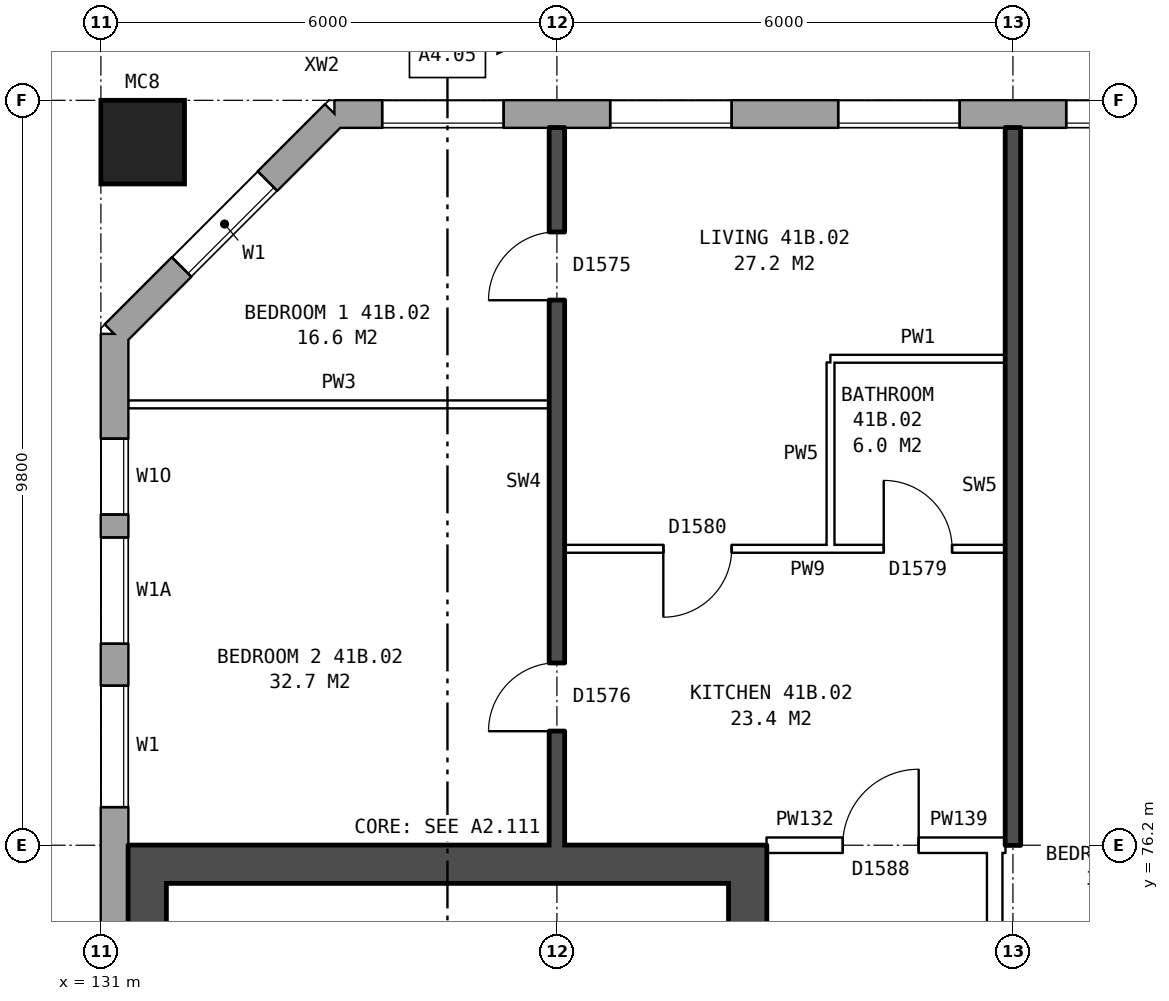
"""IFC4 building model, lengths in metres.
Left out: names, types, materials, properties, quantities, classifications, styles, units other than length and angle.
Written with IfcOpenShell. Run it as: python <this file> out.ifc"""

import sys

from ifc_helpers import new_model, si_unit, direction, frame, frame_2d, origin, origin_2d, place, context, subcontext, project, spatial, rectangle, hollow_rectangle, extrude, element, fill, save


model = new_model("IFC4")
c1 = context("Model", 3, precision=1e-05, world=origin(), true_north=direction((0.0, 1.0)))
c2 = subcontext(c1, "Body", "Model", "MODEL_VIEW")
j1 = project(units=[si_unit("LENGTHUNIT", "METRE"), si_unit("PLANEANGLEUNIT", "RADIAN")], contexts=[c1])
p1 = place(None, origin())
s1 = spatial("IfcSite", under=j1, at=p1, CompositionType="ELEMENT")
p2 = place(p1, origin())
s2 = spatial("IfcBuilding", under=s1, at=p2, CompositionType="ELEMENT")
p3 = place(p2, frame((0.0, 0.0, 148.5)))
s3 = spatial("IfcBuildingStorey", under=s2, at=p3, CompositionType="ELEMENT", Elevation=148.5)
p4 = place(p3, frame((131.55, 85.45, 0.0), z_axis=(0.0, 0.0, 1.0), x_axis=(1.0, 0.0, 0.0)))
e1 = element("IfcColumn", 1, at=p4, inside=s3, PredefinedType="COLUMN", context=c2, shape_type="SweptSolid", body=[
    extrude(hollow_rectangle(XDim=1.1, YDim=1.1, WallThickness=0.06, at=origin_2d()), origin(), (0.0, 0.0, 1.0), 3.1),
])
p5 = place(p3, frame((168.425, 85.82, 0.0), z_axis=(0.0, 0.0, 1.0), x_axis=(-1.0, 0.0, 0.0)))
e2 = element("IfcWall", 2, at=p5, inside=s3, PredefinedType="STANDARD", context=c2, shape_type="SweptSolid", body=[
    extrude(rectangle(XDim=34.351, YDim=0.36, at=frame_2d((17.175, 0.0))), origin(), (0.0, 0.0, 1.0), 2.85),
])
p6 = place(p5, frame((2.125, 0.0, 0.8)))
e3 = element("IfcOpeningElement", 3, at=p6, cuts=e2, PredefinedType="OPENING", context=c2, shape_type="SweptSolid", body=[
    extrude(rectangle(XDim=1.6, YDim=1.8, at=frame_2d((0.8, 0.9))), frame((0.0, 0.19, 0.0), z_axis=(0.0, -1.0, 0.0), x_axis=(1.0, 0.0, 0.0)), (0.0, 0.0, 1.0), 0.38),
])
p7 = place(p5, frame((5.125, 0.0, 0.8)))
e4 = element("IfcOpeningElement", 4, at=p7, cuts=e2, PredefinedType="OPENING", context=c2, shape_type="SweptSolid", body=[
    extrude(rectangle(XDim=1.6, YDim=1.8, at=frame_2d((0.8, 0.9))), frame((0.0, 0.19, 0.0), z_axis=(0.0, -1.0, 0.0), x_axis=(1.0, 0.0, 0.0)), (0.0, 0.0, 1.0), 0.38),
])
p8 = place(p5, frame((8.125, 0.0, 0.8)))
e5 = element("IfcOpeningElement", 5, at=p8, cuts=e2, PredefinedType="OPENING", context=c2, shape_type="SweptSolid", body=[
    extrude(rectangle(XDim=1.6, YDim=1.8, at=frame_2d((0.8, 0.9))), frame((0.0, 0.19, 0.0), z_axis=(0.0, -1.0, 0.0), x_axis=(1.0, 0.0, 0.0)), (0.0, 0.0, 1.0), 0.38),
])
p9 = place(p5, frame((11.125, 0.0, 0.8)))
e6 = element("IfcOpeningElement", 6, at=p9, cuts=e2, PredefinedType="OPENING", context=c2, shape_type="SweptSolid", body=[
    extrude(rectangle(XDim=1.6, YDim=1.8, at=frame_2d((0.8, 0.9))), frame((0.0, 0.19, 0.0), z_axis=(0.0, -1.0, 0.0), x_axis=(1.0, 0.0, 0.0)), (0.0, 0.0, 1.0), 0.38),
])
p10 = place(p5, frame((14.125, 0.0, 0.8)))
e7 = element("IfcOpeningElement", 7, at=p10, cuts=e2, PredefinedType="OPENING", context=c2, shape_type="SweptSolid", body=[
    extrude(rectangle(XDim=1.6, YDim=1.8, at=frame_2d((0.8, 0.9))), frame((0.0, 0.19, 0.0), z_axis=(0.0, -1.0, 0.0), x_axis=(1.0, 0.0, 0.0)), (0.0, 0.0, 1.0), 0.38),
])
p11 = place(p5, frame((17.125, 0.0, 0.8)))
e8 = element("IfcOpeningElement", 8, at=p11, cuts=e2, PredefinedType="OPENING", context=c2, shape_type="SweptSolid", body=[
    extrude(rectangle(XDim=1.6, YDim=1.8, at=frame_2d((0.8, 0.9))), frame((0.0, 0.19, 0.0), z_axis=(0.0, -1.0, 0.0), x_axis=(1.0, 0.0, 0.0)), (0.0, 0.0, 1.0), 0.38),
])
p12 = place(p5, frame((20.125, 0.0, 0.8)))
e9 = element("IfcOpeningElement", 9, at=p12, cuts=e2, PredefinedType="OPENING", context=c2, shape_type="SweptSolid", body=[
    extrude(rectangle(XDim=1.6, YDim=1.8, at=frame_2d((0.8, 0.9))), frame((0.0, 0.19, 0.0), z_axis=(0.0, -1.0, 0.0), x_axis=(1.0, 0.0, 0.0)), (0.0, 0.0, 1.0), 0.38),
])
p13 = place(p5, frame((23.125, 0.0, 0.8)))
e10 = element("IfcOpeningElement", 10, at=p13, cuts=e2, PredefinedType="OPENING", context=c2, shape_type="SweptSolid", body=[
    extrude(rectangle(XDim=1.6, YDim=1.8, at=frame_2d((0.8, 0.9))), frame((0.0, 0.19, 0.0), z_axis=(0.0, -1.0, 0.0), x_axis=(1.0, 0.0, 0.0)), (0.0, 0.0, 1.0), 0.38),
])
p14 = place(p5, frame((26.125, 0.0, 0.8)))
e11 = element("IfcOpeningElement", 11, at=p14, cuts=e2, PredefinedType="OPENING", context=c2, shape_type="SweptSolid", body=[
    extrude(rectangle(XDim=1.6, YDim=1.8, at=frame_2d((0.8, 0.9))), frame((0.0, 0.19, 0.0), z_axis=(0.0, -1.0, 0.0), x_axis=(1.0, 0.0, 0.0)), (0.0, 0.0, 1.0), 0.38),
])
p15 = place(p5, frame((29.125, 0.0, 0.8)))
e12 = element("IfcOpeningElement", 12, at=p15, cuts=e2, PredefinedType="OPENING", context=c2, shape_type="SweptSolid", body=[
    extrude(rectangle(XDim=1.6, YDim=1.8, at=frame_2d((0.8, 0.9))), frame((0.0, 0.19, 0.0), z_axis=(0.0, -1.0, 0.0), x_axis=(1.0, 0.0, 0.0)), (0.0, 0.0, 1.0), 0.38),
])
p16 = place(p5, frame((32.125, 0.0, 0.8)))
e13 = element("IfcOpeningElement", 13, at=p16, cuts=e2, PredefinedType="OPENING", context=c2, shape_type="SweptSolid", body=[
    extrude(rectangle(XDim=1.6, YDim=1.8, at=frame_2d((0.8, 0.9))), frame((0.0, 0.19, 0.0), z_axis=(0.0, -1.0, 0.0), x_axis=(1.0, 0.0, 0.0)), (0.0, 0.0, 1.0), 0.38),
])
p17 = place(p3, frame((134.075, 85.82, 0.0), z_axis=(0.0, 0.0, 1.0), x_axis=(-0.707106781187, -0.707106781187, 0.0)))
e14 = element("IfcWall", 14, at=p17, inside=s3, PredefinedType="STANDARD", context=c2, shape_type="SweptSolid", body=[
    extrude(rectangle(XDim=4.094, YDim=0.36, at=frame_2d((2.047, 0.0))), origin(), (0.0, 0.0, 1.0), 2.85),
])
p18 = place(p17, frame((1.247, 0.0, 0.8)))
e15 = element("IfcOpeningElement", 15, at=p18, cuts=e14, PredefinedType="OPENING", context=c2, shape_type="SweptSolid", body=[
    extrude(rectangle(XDim=1.6, YDim=1.8, at=frame_2d((0.8, 0.9))), frame((0.0, 0.19, 0.0), z_axis=(0.0, -1.0, 0.0), x_axis=(1.0, 0.0, 0.0)), (0.0, 0.0, 1.0), 0.38),
])
p19 = place(p3, frame((131.18, 82.925, 0.0), z_axis=(0.0, 0.0, 1.0), x_axis=(0.0, -1.0, 0.0)))
e16 = element("IfcWall", 16, at=p19, inside=s3, PredefinedType="STANDARD", context=c2, shape_type="SweptSolid", body=[
    extrude(rectangle(XDim=25.851, YDim=0.36, at=frame_2d((12.925, 0.0))), origin(), (0.0, 0.0, 1.0), 2.85),
])
p20 = place(p19, frame((1.375, 0.0, 0.8)))
e17 = element("IfcOpeningElement", 17, at=p20, cuts=e16, PredefinedType="OPENING", context=c2, shape_type="SweptSolid", body=[
    extrude(rectangle(XDim=1.0, YDim=1.2, at=frame_2d((0.5, 0.6))), frame((0.0, 0.19, 0.0), z_axis=(0.0, -1.0, 0.0), x_axis=(1.0, 0.0, 0.0)), (0.0, 0.0, 1.0), 0.38),
])
p21 = place(p19, frame((4.625, 0.0, 0.8)))
e18 = element("IfcOpeningElement", 18, at=p21, cuts=e16, PredefinedType="OPENING", context=c2, shape_type="SweptSolid", body=[
    extrude(rectangle(XDim=1.6, YDim=1.8, at=frame_2d((0.8, 0.9))), frame((0.0, 0.19, 0.0), z_axis=(0.0, -1.0, 0.0), x_axis=(1.0, 0.0, 0.0)), (0.0, 0.0, 1.0), 0.38),
])
p22 = place(p19, frame((19.625, 0.0, 0.8)))
e19 = element("IfcOpeningElement", 19, at=p22, cuts=e16, PredefinedType="OPENING", context=c2, shape_type="SweptSolid", body=[
    extrude(rectangle(XDim=1.6, YDim=1.8, at=frame_2d((0.8, 0.9))), frame((0.0, 0.19, 0.0), z_axis=(0.0, -1.0, 0.0), x_axis=(1.0, 0.0, 0.0)), (0.0, 0.0, 1.0), 0.38),
])
p23 = place(p19, frame((21.525, 0.0, 0.8)))
e20 = element("IfcOpeningElement", 20, at=p23, cuts=e16, PredefinedType="OPENING", context=c2, shape_type="SweptSolid", body=[
    extrude(rectangle(XDim=1.4, YDim=1.8, at=frame_2d((0.7, 0.9))), frame((0.0, 0.19, 0.0), z_axis=(0.0, -1.0, 0.0), x_axis=(1.0, 0.0, 0.0)), (0.0, 0.0, 1.0), 0.38),
])
p24 = place(p19, frame((2.675, 0.0, 0.8)))
e21 = element("IfcOpeningElement", 21, at=p24, cuts=e16, PredefinedType="OPENING", context=c2, shape_type="SweptSolid", body=[
    extrude(rectangle(XDim=1.4, YDim=1.8, at=frame_2d((0.7, 0.9))), frame((0.0, 0.19, 0.0), z_axis=(0.0, -1.0, 0.0), x_axis=(1.0, 0.0, 0.0)), (0.0, 0.0, 1.0), 0.38),
])
p25 = place(p19, frame((23.225, 0.0, 0.8)))
e22 = element("IfcOpeningElement", 22, at=p25, cuts=e16, PredefinedType="OPENING", context=c2, shape_type="SweptSolid", body=[
    extrude(rectangle(XDim=1.0, YDim=1.2, at=frame_2d((0.5, 0.6))), frame((0.0, 0.19, 0.0), z_axis=(0.0, -1.0, 0.0), x_axis=(1.0, 0.0, 0.0)), (0.0, 0.0, 1.0), 0.38),
])
p26 = place(p3, frame((139.51, 63.8, 0.0), z_axis=(0.0, 0.0, 1.0), x_axis=(0.0, 1.0, 0.0)))
e23 = element("IfcWall", 23, at=p26, inside=s3, PredefinedType="SHEAR", context=c2, shape_type="SweptSolid", body=[
    extrude(rectangle(XDim=12.4, YDim=0.5, at=frame_2d((6.2, 0.0))), origin(), (0.0, 0.0, 1.0), 2.85),
])
p27 = place(p26, frame((1.325, 0.0, 0.0)))
e24 = element("IfcOpeningElement", 24, at=p27, cuts=e23, PredefinedType="OPENING", context=c2, shape_type="SweptSolid", body=[
    extrude(rectangle(XDim=1.1, YDim=2.1, at=frame_2d((0.55, 1.05))), frame((0.0, 0.26, 0.0), z_axis=(0.0, -1.0, 0.0), x_axis=(1.0, 0.0, 0.0)), (0.0, 0.0, 1.0), 0.52),
])
p28 = place(p26, frame((3.6, 0.0, 0.0)))
e25 = element("IfcOpeningElement", 25, at=p28, cuts=e23, PredefinedType="OPENING", context=c2, shape_type="SweptSolid", body=[
    extrude(rectangle(XDim=1.1, YDim=2.1, at=frame_2d((0.55, 1.05))), frame((0.0, 0.26, 0.0), z_axis=(0.0, -1.0, 0.0), x_axis=(1.0, 0.0, 0.0)), (0.0, 0.0, 1.0), 0.52),
])
p29 = place(p26, frame((5.8, 0.0, 0.0)))
e26 = element("IfcOpeningElement", 26, at=p29, cuts=e23, PredefinedType="OPENING", context=c2, shape_type="SweptSolid", body=[
    extrude(rectangle(XDim=1.1, YDim=2.1, at=frame_2d((0.55, 1.05))), frame((0.0, 0.26, 0.0), z_axis=(0.0, -1.0, 0.0), x_axis=(1.0, 0.0, 0.0)), (0.0, 0.0, 1.0), 0.52),
])
p30 = place(p26, frame((9.9, 0.0, 0.0)))
e27 = element("IfcOpeningElement", 27, at=p30, cuts=e23, PredefinedType="OPENING", context=c2, shape_type="SweptSolid", body=[
    extrude(rectangle(XDim=1.1, YDim=2.1, at=frame_2d((0.55, 1.05))), frame((0.0, 0.26, 0.0), z_axis=(0.0, -1.0, 0.0), x_axis=(1.0, 0.0, 0.0)), (0.0, 0.0, 1.0), 0.52),
])
p31 = place(p26, frame((8.125, 0.0, 0.0)))
e28 = element("IfcOpeningElement", 28, at=p31, cuts=e23, PredefinedType="OPENING", context=c2, shape_type="SweptSolid", body=[
    extrude(rectangle(XDim=0.85, YDim=2.1, at=frame_2d((0.425, 1.05))), frame((0.0, 0.26, 0.0), z_axis=(0.0, -1.0, 0.0), x_axis=(1.0, 0.0, 0.0)), (0.0, 0.0, 1.0), 0.52),
])
p32 = place(p3, frame((131.61, 63.8, 0.0), z_axis=(0.0, 0.0, 1.0), x_axis=(0.0, 1.0, 0.0)))
e29 = element("IfcWall", 29, at=p32, inside=s3, PredefinedType="SHEAR", context=c2, shape_type="SweptSolid", body=[
    extrude(rectangle(XDim=12.4, YDim=0.5, at=frame_2d((6.2, 0.0))), origin(), (0.0, 0.0, 1.0), 2.85),
])
p33 = place(p3, frame((139.26, 75.95, 0.0), z_axis=(0.0, 0.0, 1.0), x_axis=(-1.0, 0.0, 0.0)))
e30 = element("IfcWall", 30, at=p33, inside=s3, PredefinedType="SHEAR", context=c2, shape_type="SweptSolid", body=[
    extrude(rectangle(XDim=7.4, YDim=0.5, at=frame_2d((3.7, 0.0))), origin(), (0.0, 0.0, 1.0), 2.85),
])
p34 = place(p3, frame((142.76, 63.9, 0.0), z_axis=(0.0, 0.0, 1.0), x_axis=(0.0, 1.0, 0.0)))
e31 = element("IfcWall", 31, at=p34, inside=s3, PredefinedType="PARTITIONING", context=c2, shape_type="SweptSolid", body=[
    extrude(rectangle(XDim=12.2, YDim=0.2, at=frame_2d((6.1, 0.0))), origin(), (0.0, 0.0, 1.0), 2.85),
])
p35 = place(p34, frame((5.1, 0.0, 0.0)))
e32 = element("IfcOpeningElement", 32, at=p35, cuts=e31, PredefinedType="OPENING", context=c2, shape_type="SweptSolid", body=[
    extrude(rectangle(XDim=2.0, YDim=2.1, at=frame_2d((1.0, 1.05))), frame((0.0, 0.11, 0.0), z_axis=(0.0, -1.0, 0.0), x_axis=(1.0, 0.0, 0.0)), (0.0, 0.0, 1.0), 0.22),
])
p36 = place(p3, frame((139.76, 76.2, 0.0), z_axis=(0.0, 0.0, 1.0), x_axis=(1.0, 0.0, 0.0)))
e33 = element("IfcWall", 33, at=p36, inside=s3, PredefinedType="PARTITIONING", context=c2, shape_type="SweptSolid", body=[
    extrude(rectangle(XDim=3.0, YDim=0.2, at=frame_2d((1.5, 0.0))), origin(), (0.0, 0.0, 1.0), 2.85),
])
p37 = place(p36, frame((1.0, 0.0, 0.0)))
e34 = element("IfcOpeningElement", 34, at=p37, cuts=e33, PredefinedType="OPENING", context=c2, shape_type="SweptSolid", body=[
    extrude(rectangle(XDim=1.0, YDim=2.1, at=frame_2d((0.5, 1.05))), frame((0.0, 0.11, 0.0), z_axis=(0.0, -1.0, 0.0), x_axis=(1.0, 0.0, 0.0)), (0.0, 0.0, 1.0), 0.22),
])
p38 = place(p3, frame((142.76, 76.2, 0.0), z_axis=(0.0, 0.0, 1.0), x_axis=(1.0, 0.0, 0.0)))
e35 = element("IfcWall", 35, at=p38, inside=s3, PredefinedType="PARTITIONING", context=c2, shape_type="SweptSolid", body=[
    extrude(rectangle(XDim=0.14, YDim=0.2, at=frame_2d((0.07, 0.0))), origin(), (0.0, 0.0, 1.0), 2.85),
])
p39 = place(p3, frame((137.1, 80.1, 0.0), z_axis=(0.0, 0.0, 1.0), x_axis=(1.0, 0.0, 0.0)))
e36 = element("IfcWall", 36, at=p39, inside=s3, PredefinedType="PARTITIONING", context=c2, shape_type="SweptSolid", body=[
    extrude(rectangle(XDim=5.8, YDim=0.1, at=frame_2d((2.9, 0.0))), origin(), (0.0, 0.0, 1.0), 2.85),
])
p40 = place(p39, frame((1.3, 0.0, 0.0)))
e37 = element("IfcOpeningElement", 37, at=p40, cuts=e36, PredefinedType="OPENING", context=c2, shape_type="SweptSolid", body=[
    extrude(rectangle(XDim=0.9, YDim=2.1, at=frame_2d((0.45, 1.05))), frame((0.0, 0.06, 0.0), z_axis=(0.0, -1.0, 0.0), x_axis=(1.0, 0.0, 0.0)), (0.0, 0.0, 1.0), 0.12),
])
p41 = place(p39, frame((4.2, 0.0, 0.0)))
e38 = element("IfcOpeningElement", 38, at=p41, cuts=e36, PredefinedType="OPENING", context=c2, shape_type="SweptSolid", body=[
    extrude(rectangle(XDim=0.9, YDim=2.1, at=frame_2d((0.45, 1.05))), frame((0.0, 0.06, 0.0), z_axis=(0.0, -1.0, 0.0), x_axis=(1.0, 0.0, 0.0)), (0.0, 0.0, 1.0), 0.12),
])
p42 = place(p3, frame((131.36, 82.0, 0.0), z_axis=(0.0, 0.0, 1.0), x_axis=(1.0, 0.0, 0.0)))
e39 = element("IfcWall", 39, at=p42, inside=s3, PredefinedType="PARTITIONING", context=c2, shape_type="SweptSolid", body=[
    extrude(rectangle(XDim=5.54, YDim=0.1, at=frame_2d((2.77, 0.0))), origin(), (0.0, 0.0, 1.0), 2.85),
])
p43 = place(p3, frame((140.6, 82.6, 0.0), z_axis=(0.0, 0.0, 1.0), x_axis=(1.0, 0.0, 0.0)))
e40 = element("IfcWall", 40, at=p43, inside=s3, PredefinedType="PARTITIONING", context=c2, shape_type="SweptSolid", body=[
    extrude(rectangle(XDim=2.3, YDim=0.1, at=frame_2d((1.15, 0.0))), origin(), (0.0, 0.0, 1.0), 2.85),
])
p44 = place(p3, frame((137.0, 76.2, 0.0), z_axis=(0.0, 0.0, 1.0), x_axis=(0.0, 1.0, 0.0)))
e41 = element("IfcWall", 41, at=p44, inside=s3, PredefinedType="SOLIDWALL", context=c2, shape_type="SweptSolid", body=[
    extrude(rectangle(XDim=9.44, YDim=0.2, at=frame_2d((4.72, 0.0))), origin(), (0.0, 0.0, 1.0), 2.85),
])
p45 = place(p44, frame((7.17, 0.0, 0.0)))
e42 = element("IfcOpeningElement", 42, at=p45, cuts=e41, PredefinedType="OPENING", context=c2, shape_type="SweptSolid", body=[
    extrude(rectangle(XDim=0.9, YDim=2.1, at=frame_2d((0.45, 1.05))), frame((0.0, 0.11, 0.0), z_axis=(0.0, -1.0, 0.0), x_axis=(1.0, 0.0, 0.0)), (0.0, 0.0, 1.0), 0.22),
])
p46 = place(p44, frame((1.5, 0.0, 0.0)))
e43 = element("IfcOpeningElement", 43, at=p46, cuts=e41, PredefinedType="OPENING", context=c2, shape_type="SweptSolid", body=[
    extrude(rectangle(XDim=0.9, YDim=2.1, at=frame_2d((0.45, 1.05))), frame((0.0, 0.11, 0.0), z_axis=(0.0, -1.0, 0.0), x_axis=(1.0, 0.0, 0.0)), (0.0, 0.0, 1.0), 0.22),
])
p47 = place(p3, frame((140.6, 80.15, 0.0), z_axis=(0.0, 0.0, 1.0), x_axis=(0.0, 1.0, 0.0)))
e44 = element("IfcWall", 44, at=p47, inside=s3, PredefinedType="PARTITIONING", context=c2, shape_type="SweptSolid", body=[
    extrude(rectangle(XDim=2.4, YDim=0.1, at=frame_2d((1.2, 0.0))), origin(), (0.0, 0.0, 1.0), 2.85),
])
p48 = place(p3, frame((143.0, 76.2, 0.0), z_axis=(0.0, 0.0, 1.0), x_axis=(0.0, 1.0, 0.0)))
e45 = element("IfcWall", 45, at=p48, inside=s3, PredefinedType="SOLIDWALL", context=c2, shape_type="SweptSolid", body=[
    extrude(rectangle(XDim=9.44, YDim=0.2, at=frame_2d((4.72, 0.0))), origin(), (0.0, 0.0, 1.0), 2.85),
])
p49 = place(p13, origin())
e46 = element("IfcWindow", 46, at=p49, inside=s3, PartitioningType="SINGLE_PANEL", PredefinedType="WINDOW", context=c2, shape_type="SweptSolid", body=[
    extrude(rectangle(XDim=1.6, YDim=1.8, at=frame_2d((0.8, 0.9))), frame((0.0, 0.15, 0.0), z_axis=(0.0, -1.0, 0.0), x_axis=(1.0, 0.0, 0.0)), (0.0, 0.0, 1.0), 0.06),
])
fill(e10, e46)
p50 = place(p14, origin())
e47 = element("IfcWindow", 47, at=p50, inside=s3, PartitioningType="SINGLE_PANEL", PredefinedType="WINDOW", context=c2, shape_type="SweptSolid", body=[
    extrude(rectangle(XDim=1.6, YDim=1.8, at=frame_2d((0.8, 0.9))), frame((0.0, 0.15, 0.0), z_axis=(0.0, -1.0, 0.0), x_axis=(1.0, 0.0, 0.0)), (0.0, 0.0, 1.0), 0.06),
])
fill(e11, e47)
p51 = place(p15, origin())
e48 = element("IfcWindow", 48, at=p51, inside=s3, PartitioningType="SINGLE_PANEL", PredefinedType="WINDOW", context=c2, shape_type="SweptSolid", body=[
    extrude(rectangle(XDim=1.6, YDim=1.8, at=frame_2d((0.8, 0.9))), frame((0.0, 0.15, 0.0), z_axis=(0.0, -1.0, 0.0), x_axis=(1.0, 0.0, 0.0)), (0.0, 0.0, 1.0), 0.06),
])
fill(e12, e48)
p52 = place(p16, origin())
e49 = element("IfcWindow", 49, at=p52, inside=s3, PartitioningType="SINGLE_PANEL", PredefinedType="WINDOW", context=c2, shape_type="SweptSolid", body=[
    extrude(rectangle(XDim=1.6, YDim=1.8, at=frame_2d((0.8, 0.9))), frame((0.0, 0.15, 0.0), z_axis=(0.0, -1.0, 0.0), x_axis=(1.0, 0.0, 0.0)), (0.0, 0.0, 1.0), 0.06),
])
fill(e13, e49)
p53 = place(p18, origin())
e50 = element("IfcWindow", 50, at=p53, inside=s3, PartitioningType="SINGLE_PANEL", PredefinedType="WINDOW", context=c2, shape_type="SweptSolid", body=[
    extrude(rectangle(XDim=1.6, YDim=1.8, at=frame_2d((0.8, 0.9))), frame((0.0, 0.15, 0.0), z_axis=(0.0, -1.0, 0.0), x_axis=(1.0, 0.0, 0.0)), (0.0, 0.0, 1.0), 0.06),
])
fill(e15, e50)
p54 = place(p20, origin())
e51 = element("IfcWindow", 51, at=p54, inside=s3, PartitioningType="SINGLE_PANEL", PredefinedType="WINDOW", context=c2, shape_type="SweptSolid", body=[
    extrude(rectangle(XDim=1.0, YDim=1.2, at=frame_2d((0.5, 0.6))), frame((0.0, 0.15, 0.0), z_axis=(0.0, -1.0, 0.0), x_axis=(1.0, 0.0, 0.0)), (0.0, 0.0, 1.0), 0.06),
])
fill(e17, e51)
p55 = place(p21, origin())
e52 = element("IfcWindow", 52, at=p55, inside=s3, PartitioningType="SINGLE_PANEL", PredefinedType="WINDOW", context=c2, shape_type="SweptSolid", body=[
    extrude(rectangle(XDim=1.6, YDim=1.8, at=frame_2d((0.8, 0.9))), frame((0.0, 0.15, 0.0), z_axis=(0.0, -1.0, 0.0), x_axis=(1.0, 0.0, 0.0)), (0.0, 0.0, 1.0), 0.06),
])
fill(e18, e52)
p56 = place(p45, origin())
e53 = element("IfcDoor", 53, at=p56, inside=s3, OperationType="SINGLE_SWING_LEFT", PredefinedType="DOOR", context=c2, shape_type="SweptSolid", body=[
    extrude(rectangle(XDim=0.9, YDim=2.1, at=frame_2d((0.45, 1.05))), frame((0.0, 0.025, 0.0), z_axis=(0.0, -1.0, 0.0), x_axis=(1.0, 0.0, 0.0)), (0.0, 0.0, 1.0), 0.05),
])
fill(e42, e53)
p57 = place(p46, origin())
e54 = element("IfcDoor", 54, at=p57, inside=s3, OperationType="SINGLE_SWING_LEFT", PredefinedType="DOOR", context=c2, shape_type="SweptSolid", body=[
    extrude(rectangle(XDim=0.9, YDim=2.1, at=frame_2d((0.45, 1.05))), frame((0.0, 0.025, 0.0), z_axis=(0.0, -1.0, 0.0), x_axis=(1.0, 0.0, 0.0)), (0.0, 0.0, 1.0), 0.05),
])
fill(e43, e54)
p58 = place(p37, origin())
e55 = element("IfcDoor", 55, at=p58, inside=s3, OperationType="SINGLE_SWING_RIGHT", PredefinedType="DOOR", context=c2, shape_type="SweptSolid", body=[
    extrude(rectangle(XDim=1.0, YDim=2.1, at=frame_2d((0.5, 1.05))), frame((0.0, 0.025, 0.0), z_axis=(0.0, -1.0, 0.0), x_axis=(1.0, 0.0, 0.0)), (0.0, 0.0, 1.0), 0.05),
])
fill(e34, e55)
p59 = place(p40, frame((0.9, 0.0, 0.0), z_axis=(0.0, 0.0, 1.0), x_axis=(-1.0, 0.0, 0.0)))
e56 = element("IfcDoor", 56, at=p59, inside=s3, OperationType="SINGLE_SWING_RIGHT", PredefinedType="DOOR", context=c2, shape_type="SweptSolid", body=[
    extrude(rectangle(XDim=0.9, YDim=2.1, at=frame_2d((0.45, 1.05))), frame((0.0, 0.025, 0.0), z_axis=(0.0, -1.0, 0.0), x_axis=(1.0, 0.0, 0.0)), (0.0, 0.0, 1.0), 0.05),
])
fill(e37, e56)
p60 = place(p41, origin())
e57 = element("IfcDoor", 57, at=p60, inside=s3, OperationType="SINGLE_SWING_LEFT", PredefinedType="DOOR", context=c2, shape_type="SweptSolid", body=[
    extrude(rectangle(XDim=0.9, YDim=2.1, at=frame_2d((0.45, 1.05))), frame((0.0, 0.025, 0.0), z_axis=(0.0, -1.0, 0.0), x_axis=(1.0, 0.0, 0.0)), (0.0, 0.0, 1.0), 0.05),
])
fill(e38, e57)
p61 = place(p24, origin())
e58 = element("IfcWindow", 58, at=p61, inside=s3, PartitioningType="SINGLE_PANEL", PredefinedType="WINDOW", context=c2, shape_type="SweptSolid", body=[
    extrude(rectangle(XDim=1.4, YDim=1.8, at=frame_2d((0.7, 0.9))), frame((0.0, 0.15, 0.0), z_axis=(0.0, -1.0, 0.0), x_axis=(1.0, 0.0, 0.0)), (0.0, 0.0, 1.0), 0.06),
])
fill(e21, e58)
save(model, sys.argv[1])
